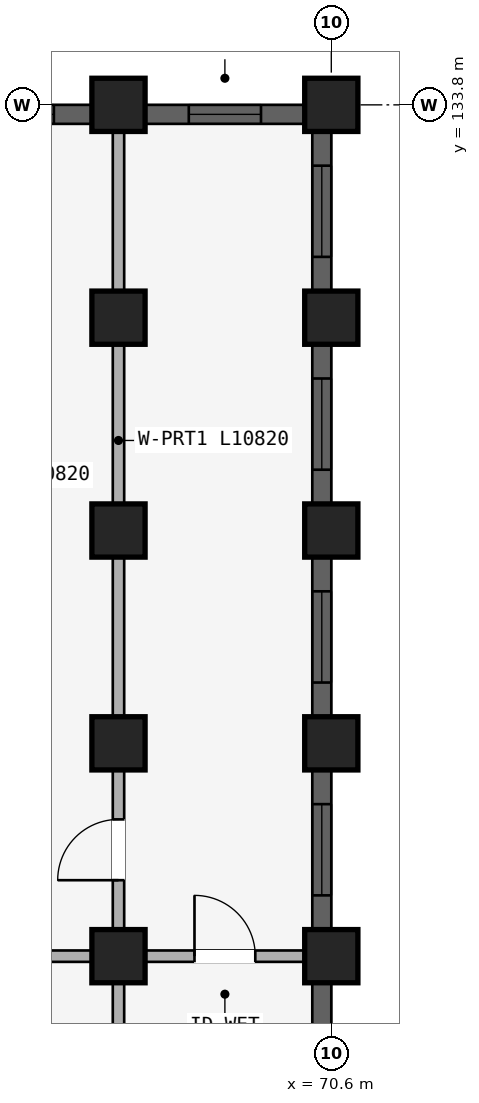
"""IFC4 building model, lengths in metres.
Left out: names, types, materials, properties, quantities, classifications, styles, units other than length and angle.
Written with IfcOpenShell. Run it as: python <this file> out.ifc"""

import sys

from ifc_helpers import new_model, si_unit, direction, frame, frame_2d, origin, origin_2d, place, context, subcontext, project, spatial, rectangle, extrude, element, fill, save


model = new_model("IFC4")
c1 = context("Model", 3, precision=1e-05, world=origin(), true_north=direction((0.0, 1.0)))
c2 = subcontext(c1, "Body", "Model", "MODEL_VIEW")
j1 = project(units=[si_unit("LENGTHUNIT", "METRE"), si_unit("PLANEANGLEUNIT", "RADIAN")], contexts=[c1])
p1 = place(None, origin())
s1 = spatial("IfcSite", under=j1, at=p1, CompositionType="ELEMENT")
p2 = place(p1, origin())
s2 = spatial("IfcBuilding", under=s1, at=p2, CompositionType="ELEMENT")
p3 = place(p2, frame((0.0, 0.0, 18.15)))
s3 = spatial("IfcBuildingStorey", under=s2, at=p3, CompositionType="ELEMENT", Elevation=18.15)
for number, where, z_axis, x_axis in (
    (1, (67.8, 122.6, 0.0), (0.0, 0.0, 1.0), (1.0, 0.0, 0.0)),
    (2, (67.8, 125.4, 0.0), (0.0, 0.0, 1.0), (1.0, 0.0, 0.0)),
    (3, (67.8, 128.2, 0.0), (0.0, 0.0, 1.0), (1.0, 0.0, 0.0)),
    (4, (67.8, 131.0, 0.0), (0.0, 0.0, 1.0), (1.0, 0.0, 0.0)),
    (5, (67.8, 133.8, 0.0), (0.0, 0.0, 1.0), (1.0, 0.0, 0.0)),
    (6, (70.6, 122.6, 0.0), (0.0, 0.0, 1.0), (1.0, 0.0, 0.0)),
    (7, (70.6, 125.4, 0.0), (0.0, 0.0, 1.0), (1.0, 0.0, 0.0)),
    (8, (70.6, 128.2, 0.0), (0.0, 0.0, 1.0), (1.0, 0.0, 0.0)),
    (9, (70.6, 131.0, 0.0), (0.0, 0.0, 1.0), (1.0, 0.0, 0.0)),
    (10, (70.6, 133.8, 0.0), (0.0, 0.0, 1.0), (1.0, 0.0, 0.0)),
):
    element("IfcColumn", number, at=place(p3, frame(where, z_axis=z_axis, x_axis=x_axis)), inside=s3, PredefinedType="COLUMN", context=c2, shape_type="SweptSolid", body=[
        extrude(rectangle(XDim=0.7, YDim=0.7, at=origin_2d()), origin(), (0.0, 0.0, 1.0), 2.93),
    ])
p4 = place(p3, frame((65.08, 122.6, 0.0), z_axis=(0.0, 0.0, 1.0), x_axis=(1.0, 0.0, 0.0)))
e11 = element("IfcWall", 11, at=p4, inside=s3, PredefinedType="PLUMBINGWALL", context=c2, shape_type="SweptSolid", body=[
    extrude(rectangle(XDim=2.64, YDim=0.15, at=frame_2d((1.32, 0.0))), origin(), (0.0, 0.0, 1.0), 2.372),
])
p5 = place(p4, frame((0.87, 0.0, 0.0)))
e12 = element("IfcOpeningElement", 12, at=p5, cuts=e11, PredefinedType="OPENING", context=c2, shape_type="SweptSolid", body=[
    extrude(rectangle(XDim=0.9, YDim=2.1, at=frame_2d((0.45, 1.05))), frame((0.0, 0.085, 0.0), z_axis=(0.0, -1.0, 0.0), x_axis=(1.0, 0.0, 0.0)), (0.0, 0.0, 1.0), 0.17),
])
p6 = place(p3, frame((67.88, 122.6, 0.0), z_axis=(0.0, 0.0, 1.0), x_axis=(1.0, 0.0, 0.0)))
e13 = element("IfcWall", 13, at=p6, inside=s3, PredefinedType="PLUMBINGWALL", context=c2, shape_type="SweptSolid", body=[
    extrude(rectangle(XDim=2.64, YDim=0.15, at=frame_2d((1.32, 0.0))), origin(), (0.0, 0.0, 1.0), 2.372),
])
p7 = place(p6, frame((0.92, 0.0, 0.0)))
e14 = element("IfcOpeningElement", 14, at=p7, cuts=e13, PredefinedType="OPENING", context=c2, shape_type="SweptSolid", body=[
    extrude(rectangle(XDim=0.8, YDim=2.1, at=frame_2d((0.4, 1.05))), frame((0.0, 0.085, 0.0), z_axis=(0.0, -1.0, 0.0), x_axis=(1.0, 0.0, 0.0)), (0.0, 0.0, 1.0), 0.17),
])
p8 = place(p3, frame((67.8, 116.05, 0.0), z_axis=(0.0, 0.0, 1.0), x_axis=(0.0, 1.0, 0.0)))
e15 = element("IfcWall", 15, at=p8, inside=s3, PredefinedType="PARTITIONING", context=c2, shape_type="SweptSolid", body=[
    extrude(rectangle(XDim=6.53, YDim=0.15, at=frame_2d((3.265, 0.0))), origin(), (0.0, 0.0, 1.0), 2.372),
])
p9 = place(p8, frame((2.815, 0.0, 0.0)))
e16 = element("IfcOpeningElement", 16, at=p9, cuts=e15, PredefinedType="OPENING", context=c2, shape_type="SweptSolid", body=[
    extrude(rectangle(XDim=0.9, YDim=2.1, at=frame_2d((0.45, 1.05))), frame((0.0, 0.085, 0.0), z_axis=(0.0, -1.0, 0.0), x_axis=(1.0, 0.0, 0.0)), (0.0, 0.0, 1.0), 0.17),
])
p10 = place(p3, frame((67.8, 122.7, 0.0), z_axis=(0.0, 0.0, 1.0), x_axis=(0.0, 1.0, 0.0)))
e17 = element("IfcWall", 17, at=p10, inside=s3, PredefinedType="PARTITIONING", context=c2, shape_type="SweptSolid", body=[
    extrude(rectangle(XDim=10.82, YDim=0.15, at=frame_2d((5.41, 0.0))), origin(), (0.0, 0.0, 1.0), 2.372),
])
p11 = place(p10, frame((0.899, 0.0, 0.0)))
e18 = element("IfcOpeningElement", 18, at=p11, cuts=e17, PredefinedType="OPENING", context=c2, shape_type="SweptSolid", body=[
    extrude(rectangle(XDim=0.8, YDim=2.1, at=frame_2d((0.4, 1.05))), frame((0.0, 0.085, 0.0), z_axis=(0.0, -1.0, 0.0), x_axis=(1.0, 0.0, 0.0)), (0.0, 0.0, 1.0), 0.17),
])
p12 = place(p3, frame((65.354, 133.675, 0.0), z_axis=(0.0, 0.0, 1.0), x_axis=(1.0, 0.0, 0.0)))
e19 = element("IfcWall", 19, at=p12, inside=s3, PredefinedType="STANDARD", context=c2, shape_type="SweptSolid", body=[
    extrude(rectangle(XDim=2.093, YDim=0.25, at=frame_2d((1.046, 0.0))), origin(), (0.0, 0.0, 1.0), 2.472),
])
p13 = place(p12, frame((0.497, 0.0, 0.822)))
e20 = element("IfcOpeningElement", 20, at=p13, cuts=e19, PredefinedType="OPENING", context=c2, shape_type="SweptSolid", body=[
    extrude(rectangle(XDim=1.1, YDim=1.45, at=frame_2d((0.55, 0.725))), frame((0.0, 0.135, 0.0), z_axis=(0.0, -1.0, 0.0), x_axis=(1.0, 0.0, 0.0)), (0.0, 0.0, 1.0), 0.27),
])
p14 = place(p3, frame((68.154, 133.675, 0.0), z_axis=(0.0, 0.0, 1.0), x_axis=(1.0, 0.0, 0.0)))
e21 = element("IfcWall", 21, at=p14, inside=s3, PredefinedType="STANDARD", context=c2, shape_type="SweptSolid", body=[
    extrude(rectangle(XDim=2.093, YDim=0.25, at=frame_2d((1.046, 0.0))), origin(), (0.0, 0.0, 1.0), 2.472),
])
p15 = place(p14, frame((0.572, 0.0, 0.88)))
e22 = element("IfcOpeningElement", 22, at=p15, cuts=e21, PredefinedType="OPENING", context=c2, shape_type="SweptSolid", body=[
    extrude(rectangle(XDim=0.95, YDim=1.35, at=frame_2d((0.475, 0.675))), frame((0.0, 0.135, 0.0), z_axis=(0.0, -1.0, 0.0), x_axis=(1.0, 0.0, 0.0)), (0.0, 0.0, 1.0), 0.27),
])
p16 = place(p3, frame((70.475, 116.354, 0.0), z_axis=(0.0, 0.0, 1.0), x_axis=(0.0, 1.0, 0.0)))
e23 = element("IfcWall", 23, at=p16, inside=s3, PredefinedType="STANDARD", context=c2, shape_type="SweptSolid", body=[
    extrude(rectangle(XDim=5.893, YDim=0.25, at=frame_2d((2.947, 0.0))), origin(), (0.0, 0.0, 1.0), 2.372),
])
p17 = place(p16, frame((2.197, 0.0, 0.522)))
e24 = element("IfcOpeningElement", 24, at=p17, cuts=e23, PredefinedType="OPENING", context=c2, shape_type="SweptSolid", body=[
    extrude(rectangle(XDim=1.5, YDim=1.65, at=frame_2d((0.75, 0.825))), frame((0.0, 0.135, 0.0), z_axis=(0.0, -1.0, 0.0), x_axis=(1.0, 0.0, 0.0)), (0.0, 0.0, 1.0), 0.27),
])
p18 = place(p3, frame((70.475, 122.954, 0.0), z_axis=(0.0, 0.0, 1.0), x_axis=(0.0, 1.0, 0.0)))
e25 = element("IfcWall", 25, at=p18, inside=s3, PredefinedType="STANDARD", context=c2, shape_type="SweptSolid", body=[
    extrude(rectangle(XDim=2.093, YDim=0.25, at=frame_2d((1.046, 0.0))), origin(), (0.0, 0.0, 1.0), 2.372),
])
p19 = place(p18, frame((0.447, 0.0, 0.672)))
e26 = element("IfcOpeningElement", 26, at=p19, cuts=e25, PredefinedType="OPENING", context=c2, shape_type="SweptSolid", body=[
    extrude(rectangle(XDim=1.2, YDim=1.5, at=frame_2d((0.6, 0.75))), frame((0.0, 0.135, 0.0), z_axis=(0.0, -1.0, 0.0), x_axis=(1.0, 0.0, 0.0)), (0.0, 0.0, 1.0), 0.27),
])
p20 = place(p3, frame((70.475, 125.753, 0.0), z_axis=(0.0, 0.0, 1.0), x_axis=(0.0, 1.0, 0.0)))
e27 = element("IfcWall", 27, at=p20, inside=s3, PredefinedType="STANDARD", context=c2, shape_type="SweptSolid", body=[
    extrude(rectangle(XDim=2.093, YDim=0.25, at=frame_2d((1.046, 0.0))), origin(), (0.0, 0.0, 1.0), 2.372),
])
p21 = place(p20, frame((0.447, 0.0, 0.672)))
e28 = element("IfcOpeningElement", 28, at=p21, cuts=e27, PredefinedType="OPENING", context=c2, shape_type="SweptSolid", body=[
    extrude(rectangle(XDim=1.2, YDim=1.5, at=frame_2d((0.6, 0.75))), frame((0.0, 0.135, 0.0), z_axis=(0.0, -1.0, 0.0), x_axis=(1.0, 0.0, 0.0)), (0.0, 0.0, 1.0), 0.27),
])
p22 = place(p3, frame((70.475, 128.553, 0.0), z_axis=(0.0, 0.0, 1.0), x_axis=(0.0, 1.0, 0.0)))
e29 = element("IfcWall", 29, at=p22, inside=s3, PredefinedType="STANDARD", context=c2, shape_type="SweptSolid", body=[
    extrude(rectangle(XDim=2.093, YDim=0.25, at=frame_2d((1.046, 0.0))), origin(), (0.0, 0.0, 1.0), 2.372),
])
p23 = place(p22, frame((0.447, 0.0, 0.672)))
e30 = element("IfcOpeningElement", 30, at=p23, cuts=e29, PredefinedType="OPENING", context=c2, shape_type="SweptSolid", body=[
    extrude(rectangle(XDim=1.2, YDim=1.5, at=frame_2d((0.6, 0.75))), frame((0.0, 0.135, 0.0), z_axis=(0.0, -1.0, 0.0), x_axis=(1.0, 0.0, 0.0)), (0.0, 0.0, 1.0), 0.27),
])
p24 = place(p3, frame((70.475, 131.354, 0.0), z_axis=(0.0, 0.0, 1.0), x_axis=(0.0, 1.0, 0.0)))
e31 = element("IfcWall", 31, at=p24, inside=s3, PredefinedType="STANDARD", context=c2, shape_type="SweptSolid", body=[
    extrude(rectangle(XDim=2.093, YDim=0.25, at=frame_2d((1.046, 0.0))), origin(), (0.0, 0.0, 1.0), 2.372),
])
p25 = place(p24, frame((0.447, 0.0, 0.672)))
e32 = element("IfcOpeningElement", 32, at=p25, cuts=e31, PredefinedType="OPENING", context=c2, shape_type="SweptSolid", body=[
    extrude(rectangle(XDim=1.2, YDim=1.5, at=frame_2d((0.6, 0.75))), frame((0.0, 0.135, 0.0), z_axis=(0.0, -1.0, 0.0), x_axis=(1.0, 0.0, 0.0)), (0.0, 0.0, 1.0), 0.27),
])
p26 = place(p13, origin())
e33 = element("IfcWindow", 33, at=p26, inside=s3, PartitioningType="SINGLE_PANEL", PredefinedType="WINDOW", context=c2, shape_type="SweptSolid", body=[
    extrude(rectangle(XDim=1.1, YDim=1.45, at=frame_2d((0.55, 0.725))), frame((0.0, 0.03, 0.0), z_axis=(0.0, -1.0, 0.0), x_axis=(1.0, 0.0, 0.0)), (0.0, 0.0, 1.0), 0.06),
])
fill(e20, e33)
p27 = place(p15, origin())
e34 = element("IfcWindow", 34, at=p27, inside=s3, PartitioningType="SINGLE_PANEL", PredefinedType="WINDOW", context=c2, shape_type="SweptSolid", body=[
    extrude(rectangle(XDim=0.95, YDim=1.35, at=frame_2d((0.475, 0.675))), frame((0.0, 0.03, 0.0), z_axis=(0.0, -1.0, 0.0), x_axis=(1.0, 0.0, 0.0)), (0.0, 0.0, 1.0), 0.06),
])
fill(e22, e34)
p28 = place(p19, origin())
e35 = element("IfcWindow", 35, at=p28, inside=s3, PartitioningType="SINGLE_PANEL", PredefinedType="WINDOW", context=c2, shape_type="SweptSolid", body=[
    extrude(rectangle(XDim=1.2, YDim=1.5, at=frame_2d((0.6, 0.75))), frame((0.0, 0.03, 0.0), z_axis=(0.0, -1.0, 0.0), x_axis=(1.0, 0.0, 0.0)), (0.0, 0.0, 1.0), 0.06),
])
fill(e26, e35)
p29 = place(p21, origin())
e36 = element("IfcWindow", 36, at=p29, inside=s3, PartitioningType="SINGLE_PANEL", PredefinedType="WINDOW", context=c2, shape_type="SweptSolid", body=[
    extrude(rectangle(XDim=1.2, YDim=1.5, at=frame_2d((0.6, 0.75))), frame((0.0, 0.03, 0.0), z_axis=(0.0, -1.0, 0.0), x_axis=(1.0, 0.0, 0.0)), (0.0, 0.0, 1.0), 0.06),
])
fill(e28, e36)
p30 = place(p23, origin())
e37 = element("IfcWindow", 37, at=p30, inside=s3, PartitioningType="SINGLE_PANEL", PredefinedType="WINDOW", context=c2, shape_type="SweptSolid", body=[
    extrude(rectangle(XDim=1.2, YDim=1.5, at=frame_2d((0.6, 0.75))), frame((0.0, 0.03, 0.0), z_axis=(0.0, -1.0, 0.0), x_axis=(1.0, 0.0, 0.0)), (0.0, 0.0, 1.0), 0.06),
])
fill(e30, e37)
p31 = place(p25, origin())
e38 = element("IfcWindow", 38, at=p31, inside=s3, PartitioningType="SINGLE_PANEL", PredefinedType="WINDOW", context=c2, shape_type="SweptSolid", body=[
    extrude(rectangle(XDim=1.2, YDim=1.5, at=frame_2d((0.6, 0.75))), frame((0.0, 0.03, 0.0), z_axis=(0.0, -1.0, 0.0), x_axis=(1.0, 0.0, 0.0)), (0.0, 0.0, 1.0), 0.06),
])
fill(e32, e38)
p32 = place(p7, origin())
e39 = element("IfcDoor", 39, at=p32, inside=s3, OperationType="SINGLE_SWING_LEFT", PredefinedType="DOOR", context=c2, shape_type="SweptSolid", body=[
    extrude(rectangle(XDim=0.8, YDim=2.1, at=frame_2d((0.4, 1.05))), frame((0.0, 0.025, 0.0), z_axis=(0.0, -1.0, 0.0), x_axis=(1.0, 0.0, 0.0)), (0.0, 0.0, 1.0), 0.05),
])
fill(e14, e39)
p33 = place(p11, frame((0.8, 0.0, 0.0), z_axis=(0.0, 0.0, 1.0), x_axis=(-1.0, 0.0, 0.0)))
e40 = element("IfcDoor", 40, at=p33, inside=s3, OperationType="SINGLE_SWING_RIGHT", PredefinedType="DOOR", context=c2, shape_type="SweptSolid", body=[
    extrude(rectangle(XDim=0.8, YDim=2.1, at=frame_2d((0.4, 1.05))), frame((0.0, 0.025, 0.0), z_axis=(0.0, -1.0, 0.0), x_axis=(1.0, 0.0, 0.0)), (0.0, 0.0, 1.0), 0.05),
])
fill(e18, e40)
save(model, sys.argv[1])
